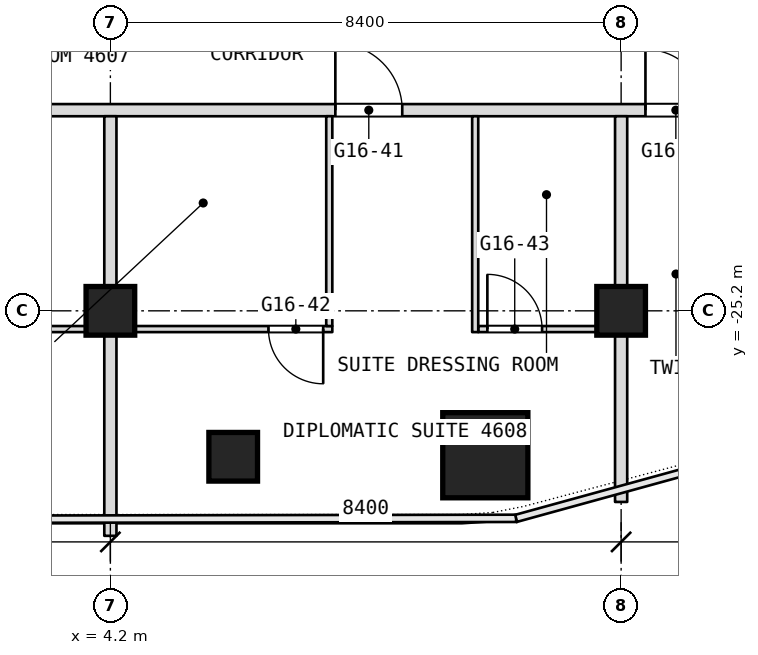
"""IFC4 building model, lengths in metres.
Left out: names, types, materials, properties, quantities, classifications, styles, units other than length and angle.
Written with IfcOpenShell. Run it as: python <this file> out.ifc"""

import sys

from ifc_helpers import new_model, si_unit, direction, frame, frame_2d, origin, origin_2d, place, context, subcontext, project, spatial, rectangle, extrude, element, fill, save


model = new_model("IFC4")
c1 = context("Model", 3, precision=1e-05, world=origin(), true_north=direction((0.0, 1.0)))
c2 = subcontext(c1, "Body", "Model", "MODEL_VIEW")
j1 = project(units=[si_unit("LENGTHUNIT", "METRE"), si_unit("PLANEANGLEUNIT", "RADIAN")], contexts=[c1])
p1 = place(None, origin())
s1 = spatial("IfcSite", under=j1, at=p1, CompositionType="ELEMENT")
p2 = place(p1, origin())
s2 = spatial("IfcBuilding", under=s1, at=p2, CompositionType="ELEMENT")
p3 = place(p2, frame((0.0, 0.0, 202.1)))
s3 = spatial("IfcBuildingStorey", under=s2, at=p3, CompositionType="ELEMENT", Elevation=202.1)
p4 = place(p3, frame((10.366, -27.575, 0.0), z_axis=(0.0, 0.0, 1.0), x_axis=(1.0, 0.0, 0.0)))
e1 = element("IfcColumn", 1, at=p4, inside=s3, PredefinedType="COLUMN", context=c2, shape_type="SweptSolid", body=[
    extrude(rectangle(XDim=1.4, YDim=1.4, at=origin_2d()), origin(), (0.0, 0.0, 1.0), 3.6),
])
for number, where, z_axis, x_axis in (
    (2, (4.2, -25.2, 0.0), (0.0, 0.0, 1.0), (1.0, 0.0, 0.0)),
    (3, (12.6, -25.2, 0.0), (0.0, 0.0, 1.0), (1.0, 0.0, 0.0)),
    (4, (6.22, -27.6, 0.0), (0.0, 0.0, 1.0), (1.0, 0.0, 0.0)),
):
    element("IfcColumn", number, at=place(p3, frame(where, z_axis=z_axis, x_axis=x_axis)), inside=s3, PredefinedType="COLUMN", context=c2, shape_type="SweptSolid", body=[
        extrude(rectangle(XDim=0.8, YDim=0.8, at=origin_2d()), origin(), (0.0, 0.0, 1.0), 3.6),
    ])
p5 = place(p3, frame((0.65, -25.5, 0.0), z_axis=(0.0, 0.0, 1.0), x_axis=(1.0, 0.0, 0.0)))
e5 = element("IfcWall", 5, at=p5, inside=s3, PredefinedType="PARTITIONING", context=c2, shape_type="SweptSolid", body=[
    extrude(rectangle(XDim=7.2, YDim=0.1, at=frame_2d((3.6, 0.0))), origin(), (0.0, 0.0, 1.0), 3.34),
])
p6 = place(p5, frame((0.15, 0.0, 0.0)))
e6 = element("IfcOpeningElement", 6, at=p6, cuts=e5, PredefinedType="OPENING", context=c2, shape_type="SweptSolid", body=[
    extrude(rectangle(XDim=0.9, YDim=2.1, at=frame_2d((0.45, 1.05))), frame((0.0, 0.05, 0.0), z_axis=(0.0, -1.0, 0.0), x_axis=(1.0, 0.0, 0.0)), (0.0, 0.0, 1.0), 0.1),
])
p7 = place(p5, frame((6.15, 0.0, 0.0)))
e7 = element("IfcOpeningElement", 7, at=p7, cuts=e5, PredefinedType="OPENING", context=c2, shape_type="SweptSolid", body=[
    extrude(rectangle(XDim=0.9, YDim=2.1, at=frame_2d((0.45, 1.05))), frame((0.0, 0.05, 0.0), z_axis=(0.0, -1.0, 0.0), x_axis=(1.0, 0.0, 0.0)), (0.0, 0.0, 1.0), 0.1),
])
p8 = place(p3, frame((10.25, -25.5, 0.0), z_axis=(0.0, 0.0, 1.0), x_axis=(1.0, 0.0, 0.0)))
e8 = element("IfcWall", 8, at=p8, inside=s3, PredefinedType="PARTITIONING", context=c2, shape_type="SweptSolid", body=[
    extrude(rectangle(XDim=2.45, YDim=0.1, at=frame_2d((1.225, 0.0))), origin(), (0.0, 0.0, 1.0), 3.34),
])
p9 = place(p8, frame((0.15, 0.0, 0.0)))
e9 = element("IfcOpeningElement", 9, at=p9, cuts=e8, PredefinedType="OPENING", context=c2, shape_type="SweptSolid", body=[
    extrude(rectangle(XDim=0.9, YDim=2.1, at=frame_2d((0.45, 1.05))), frame((0.0, 0.05, 0.0), z_axis=(0.0, -1.0, 0.0), x_axis=(1.0, 0.0, 0.0)), (0.0, 0.0, 1.0), 0.1),
])
p10 = place(p3, frame((-16.7, -21.9, 0.0), z_axis=(0.0, 0.0, 1.0), x_axis=(1.0, 0.0, 0.0)))
e10 = element("IfcWall", 10, at=p10, inside=s3, PredefinedType="PARTITIONING", context=c2, shape_type="SweptSolid", body=[
    extrude(rectangle(XDim=33.4, YDim=0.2, at=frame_2d((16.7, 0.0))), origin(), (0.0, 0.0, 1.0), 3.34),
])
p11 = place(p10, frame((0.3, 0.0, 0.0)))
e11 = element("IfcOpeningElement", 11, at=p11, cuts=e10, PredefinedType="OPENING", context=c2, shape_type="SweptSolid", body=[
    extrude(rectangle(XDim=1.0, YDim=2.1, at=frame_2d((0.5, 1.05))), frame((0.0, 0.1, 0.0), z_axis=(0.0, -1.0, 0.0), x_axis=(1.0, 0.0, 0.0)), (0.0, 0.0, 1.0), 0.2),
])
p12 = place(p10, frame((9.85, 0.0, 0.0)))
e12 = element("IfcOpeningElement", 12, at=p12, cuts=e10, PredefinedType="OPENING", context=c2, shape_type="SweptSolid", body=[
    extrude(rectangle(XDim=1.1, YDim=2.1, at=frame_2d((0.55, 1.05))), frame((0.0, 0.1, 0.0), z_axis=(0.0, -1.0, 0.0), x_axis=(1.0, 0.0, 0.0)), (0.0, 0.0, 1.0), 0.2),
])
p13 = place(p10, frame((16.1, 0.0, 0.0)))
e13 = element("IfcOpeningElement", 13, at=p13, cuts=e10, PredefinedType="OPENING", context=c2, shape_type="SweptSolid", body=[
    extrude(rectangle(XDim=1.1, YDim=2.1, at=frame_2d((0.55, 1.05))), frame((0.0, 0.1, 0.0), z_axis=(0.0, -1.0, 0.0), x_axis=(1.0, 0.0, 0.0)), (0.0, 0.0, 1.0), 0.2),
])
p14 = place(p10, frame((24.6, 0.0, 0.0)))
e14 = element("IfcOpeningElement", 14, at=p14, cuts=e10, PredefinedType="OPENING", context=c2, shape_type="SweptSolid", body=[
    extrude(rectangle(XDim=1.1, YDim=2.1, at=frame_2d((0.55, 1.05))), frame((0.0, 0.1, 0.0), z_axis=(0.0, -1.0, 0.0), x_axis=(1.0, 0.0, 0.0)), (0.0, 0.0, 1.0), 0.2),
])
p15 = place(p10, frame((29.7, 0.0, 0.0)))
e15 = element("IfcOpeningElement", 15, at=p15, cuts=e10, PredefinedType="OPENING", context=c2, shape_type="SweptSolid", body=[
    extrude(rectangle(XDim=1.0, YDim=2.1, at=frame_2d((0.5, 1.05))), frame((0.0, 0.1, 0.0), z_axis=(0.0, -1.0, 0.0), x_axis=(1.0, 0.0, 0.0)), (0.0, 0.0, 1.0), 0.2),
])
p16 = place(p3, frame((12.6, -28.343, 0.0), z_axis=(0.0, 0.0, 1.0), x_axis=(0.0, 1.0, 0.0)))
e16 = element("IfcWall", 16, at=p16, inside=s3, PredefinedType="PARTITIONING", context=c2, shape_type="SweptSolid", body=[
    extrude(rectangle(XDim=6.343, YDim=0.2, at=frame_2d((3.171, 0.0))), origin(), (0.0, 0.0, 1.0), 3.34),
])
p17 = place(p3, frame((10.2, -25.55, 0.0), z_axis=(0.0, 0.0, 1.0), x_axis=(0.0, 1.0, 0.0)))
e17 = element("IfcWall", 17, at=p17, inside=s3, PredefinedType="PARTITIONING", context=c2, shape_type="SweptSolid", body=[
    extrude(rectangle(XDim=3.55, YDim=0.1, at=frame_2d((1.775, 0.0))), origin(), (0.0, 0.0, 1.0), 3.34),
])
p18 = place(p3, frame((7.8, -25.45, 0.0), z_axis=(0.0, 0.0, 1.0), x_axis=(0.0, 1.0, 0.0)))
e18 = element("IfcWall", 18, at=p18, inside=s3, PredefinedType="PARTITIONING", context=c2, shape_type="SweptSolid", body=[
    extrude(rectangle(XDim=3.45, YDim=0.1, at=frame_2d((1.725, 0.0))), origin(), (0.0, 0.0, 1.0), 3.34),
])
p19 = place(p3, frame((4.2, -28.9, 0.0), z_axis=(0.0, 0.0, 1.0), x_axis=(0.0, 1.0, 0.0)))
e19 = element("IfcWall", 19, at=p19, inside=s3, PredefinedType="PARTITIONING", context=c2, shape_type="SweptSolid", body=[
    extrude(rectangle(XDim=6.9, YDim=0.2, at=frame_2d((3.45, 0.0))), origin(), (0.0, 0.0, 1.0), 3.34),
])
p20 = place(p7, origin())
e20 = element("IfcDoor", 20, at=p20, inside=s3, OperationType="SINGLE_SWING_RIGHT", PredefinedType="DOOR", context=c2, shape_type="SweptSolid", body=[
    extrude(rectangle(XDim=0.9, YDim=2.1, at=frame_2d((0.45, 1.05))), frame((0.0, 0.025, 0.0), z_axis=(0.0, -1.0, 0.0), x_axis=(1.0, 0.0, 0.0)), (0.0, 0.0, 1.0), 0.05),
])
fill(e7, e20)
p21 = place(p9, origin())
e21 = element("IfcDoor", 21, at=p21, inside=s3, OperationType="SINGLE_SWING_LEFT", PredefinedType="DOOR", context=c2, shape_type="SweptSolid", body=[
    extrude(rectangle(XDim=0.9, YDim=2.1, at=frame_2d((0.45, 1.05))), frame((0.0, 0.025, 0.0), z_axis=(0.0, -1.0, 0.0), x_axis=(1.0, 0.0, 0.0)), (0.0, 0.0, 1.0), 0.05),
])
fill(e9, e21)
p22 = place(p14, origin())
e22 = element("IfcDoor", 22, at=p22, inside=s3, OperationType="SINGLE_SWING_RIGHT", PredefinedType="DOOR", context=c2, shape_type="SweptSolid", body=[
    extrude(rectangle(XDim=1.1, YDim=2.1, at=frame_2d((0.55, 1.05))), frame((0.0, 0.025, 0.0), z_axis=(0.0, -1.0, 0.0), x_axis=(1.0, 0.0, 0.0)), (0.0, 0.0, 1.0), 0.05),
])
fill(e14, e22)
p23 = place(p15, origin())
e23 = element("IfcDoor", 23, at=p23, inside=s3, OperationType="SINGLE_SWING_RIGHT", PredefinedType="DOOR", context=c2, shape_type="SweptSolid", body=[
    extrude(rectangle(XDim=1.0, YDim=2.1, at=frame_2d((0.5, 1.05))), frame((0.0, 0.025, 0.0), z_axis=(0.0, -1.0, 0.0), x_axis=(1.0, 0.0, 0.0)), (0.0, 0.0, 1.0), 0.05),
])
fill(e15, e23)
save(model, sys.argv[1])
